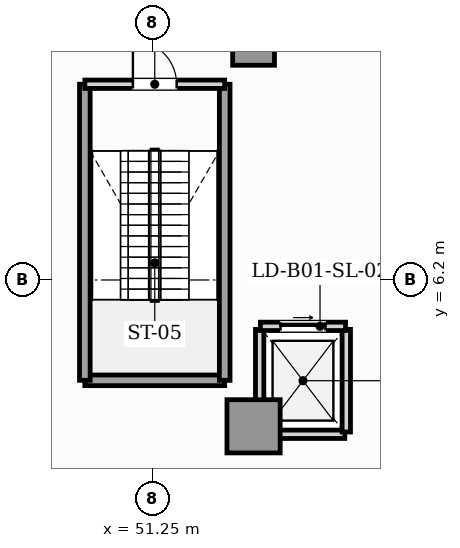
"""IFC4 building model, lengths in metres.
Left out: names, types, materials, properties, quantities, classifications, styles, units other than length and angle.
Written with IfcOpenShell. Run it as: python <this file> out.ifc"""

import sys

from ifc_helpers import new_model, si_unit, direction, frame, frame_2d, origin, origin_2d, place, context, subcontext, project, spatial, rectangle, hollow_rectangle, extrude, element, fill, save


model = new_model("IFC4")
c1 = context("Model", 3, precision=1e-05, world=origin(), true_north=direction((0.0, 1.0)))
c2 = subcontext(c1, "Body", "Model", "MODEL_VIEW")
j1 = project(units=[si_unit("LENGTHUNIT", "METRE"), si_unit("PLANEANGLEUNIT", "RADIAN")], contexts=[c1])
p1 = place(None, origin())
s1 = spatial("IfcSite", under=j1, at=p1, CompositionType="ELEMENT")
p2 = place(p1, origin())
s2 = spatial("IfcBuilding", under=s1, at=p2, CompositionType="ELEMENT")
p3 = place(p2, frame((0.0, 0.0, -5.4)))
s3 = spatial("IfcBuildingStorey", under=s2, at=p3, CompositionType="ELEMENT", Elevation=-5.4)
p4 = place(p3, frame((53.9, 2.35, 0.0), z_axis=(0.0, 0.0, 1.0), x_axis=(1.0, 0.0, 0.0)))
e1 = element("IfcColumn", 1, at=p4, inside=s3, PredefinedType="USERDEFINED", context=c2, shape_type="SweptSolid", body=[
    extrude(hollow_rectangle(XDim=1.4, YDim=1.4, WallThickness=0.08, at=origin_2d()), origin(), (0.0, 0.0, 1.0), 5.4),
])
p5 = place(p3, frame((53.9, 12.4, 0.0), z_axis=(0.0, 0.0, 1.0), x_axis=(1.0, 0.0, 0.0)))
e2 = element("IfcColumn", 2, at=p5, inside=s3, PredefinedType="COLUMN", context=c2, shape_type="SweptSolid", body=[
    extrude(rectangle(XDim=1.1, YDim=1.1, at=origin_2d()), origin(), (0.0, 0.0, 1.0), 5.4),
])
p6 = place(p3, frame((54.1, 2.14, 0.0), z_axis=(0.0, 0.0, 1.0), x_axis=(1.0, 0.0, 0.0)))
e3 = element("IfcWall", 3, at=p6, inside=s3, PredefinedType="SOLIDWALL", context=c2, shape_type="SweptSolid", body=[
    extrude(rectangle(XDim=2.2, YDim=0.22, at=frame_2d((1.1, 0.0))), origin(), (0.0, 0.0, 1.0), 5.05),
])
p7 = place(p3, frame((54.06, 2.2, 0.0), z_axis=(0.0, 0.0, 1.0), x_axis=(0.0, 1.0, 0.0)))
e4 = element("IfcWall", 4, at=p7, inside=s3, PredefinedType="SOLIDWALL", context=c2, shape_type="SweptSolid", body=[
    extrude(rectangle(XDim=2.7, YDim=0.22, at=frame_2d((1.35, 0.0))), origin(), (0.0, 0.0, 1.0), 4.433),
])
p8 = place(p3, frame((56.34, 2.2, 0.0), z_axis=(0.0, 0.0, 1.0), x_axis=(0.0, 1.0, 0.0)))
e5 = element("IfcWall", 5, at=p8, inside=s3, PredefinedType="SOLIDWALL", context=c2, shape_type="SweptSolid", body=[
    extrude(rectangle(XDim=2.7, YDim=0.22, at=frame_2d((1.35, 0.0))), origin(), (0.0, 0.0, 1.0), 5.05),
])
p9 = place(p3, frame((54.08, 4.98, 0.0), z_axis=(0.0, 0.0, 1.0), x_axis=(1.0, 0.0, 0.0)))
e6 = element("IfcWall", 6, at=p9, inside=s3, PredefinedType="SOLIDWALL", context=c2, shape_type="SweptSolid", body=[
    extrude(rectangle(XDim=2.24, YDim=0.22, at=frame_2d((1.12, 0.0))), origin(), (0.0, 0.0, 1.0), 5.05),
])
p10 = place(p9, frame((0.53, 0.0, 0.0)))
e7 = element("IfcOpeningElement", 7, at=p10, cuts=e6, PredefinedType="OPENING", context=c2, shape_type="SweptSolid", body=[
    extrude(rectangle(XDim=1.18, YDim=2.2, at=frame_2d((0.59, 1.1))), frame((0.0, 0.12, 0.0), z_axis=(0.0, -1.0, 0.0), x_axis=(1.0, 0.0, 0.0)), (0.0, 0.0, 1.0), 0.24),
])
p11 = place(p3, frame((49.46, 3.56, 0.0), z_axis=(0.0, 0.0, 1.0), x_axis=(1.0, 0.0, 0.0)))
e8 = element("IfcWall", 8, at=p11, inside=s3, PredefinedType="SHEAR", context=c2, shape_type="SweptSolid", body=[
    extrude(rectangle(XDim=3.68, YDim=0.28, at=frame_2d((1.84, 0.0))), origin(), (0.0, 0.0, 1.0), 5.05),
])
for number, where, z_axis, x_axis in (
    (9, (49.46, 3.56, 0.0), (0.0, 0.0, 1.0), (0.0, 1.0, 0.0)),
    (10, (53.14, 3.56, 0.0), (0.0, 0.0, 1.0), (0.0, 1.0, 0.0)),
):
    element("IfcWall", number, at=place(p3, frame(where, z_axis=z_axis, x_axis=x_axis)), inside=s3, PredefinedType="SHEAR", context=c2, shape_type="SweptSolid", body=[
        extrude(rectangle(XDim=7.79, YDim=0.28, at=frame_2d((3.895, 0.0))), origin(), (0.0, 0.0, 1.0), 5.05),
    ])
p12 = place(p3, frame((49.46, 11.35, 0.0), z_axis=(0.0, 0.0, 1.0), x_axis=(1.0, 0.0, 0.0)))
e11 = element("IfcWall", 11, at=p12, inside=s3, PredefinedType="SOLIDWALL", context=c2, shape_type="SweptSolid", body=[
    extrude(rectangle(XDim=3.68, YDim=0.22, at=frame_2d((1.84, 0.0))), origin(), (0.0, 0.0, 1.0), 5.05),
])
p13 = place(p12, frame((1.265, 0.0, 0.0)))
e12 = element("IfcOpeningElement", 12, at=p13, cuts=e11, PredefinedType="OPENING", context=c2, shape_type="SweptSolid", body=[
    extrude(rectangle(XDim=1.15, YDim=2.2, at=frame_2d((0.575, 1.1))), frame((0.0, 0.12, 0.0), z_axis=(0.0, -1.0, 0.0), x_axis=(1.0, 0.0, 0.0)), (0.0, 0.0, 1.0), 0.24),
])
p14 = place(p10, origin())
e13 = element("IfcDoor", 13, at=p14, inside=s3, OperationType="SLIDING_TO_RIGHT", PredefinedType="DOOR", context=c2, shape_type="SweptSolid", body=[
    extrude(rectangle(XDim=1.18, YDim=2.2, at=frame_2d((0.59, 1.1))), frame((0.0, 0.025, 0.0), z_axis=(0.0, -1.0, 0.0), x_axis=(1.0, 0.0, 0.0)), (0.0, 0.0, 1.0), 0.05),
])
fill(e7, e13)
p15 = place(p13, origin())
e14 = element("IfcDoor", 14, at=p15, inside=s3, OperationType="SINGLE_SWING_LEFT", PredefinedType="DOOR", context=c2, shape_type="SweptSolid", body=[
    extrude(rectangle(XDim=1.15, YDim=2.2, at=frame_2d((0.575, 1.1))), frame((0.0, 0.025, 0.0), z_axis=(0.0, -1.0, 0.0), x_axis=(1.0, 0.0, 0.0)), (0.0, 0.0, 1.0), 0.05),
])
fill(e12, e14)
save(model, sys.argv[1])
